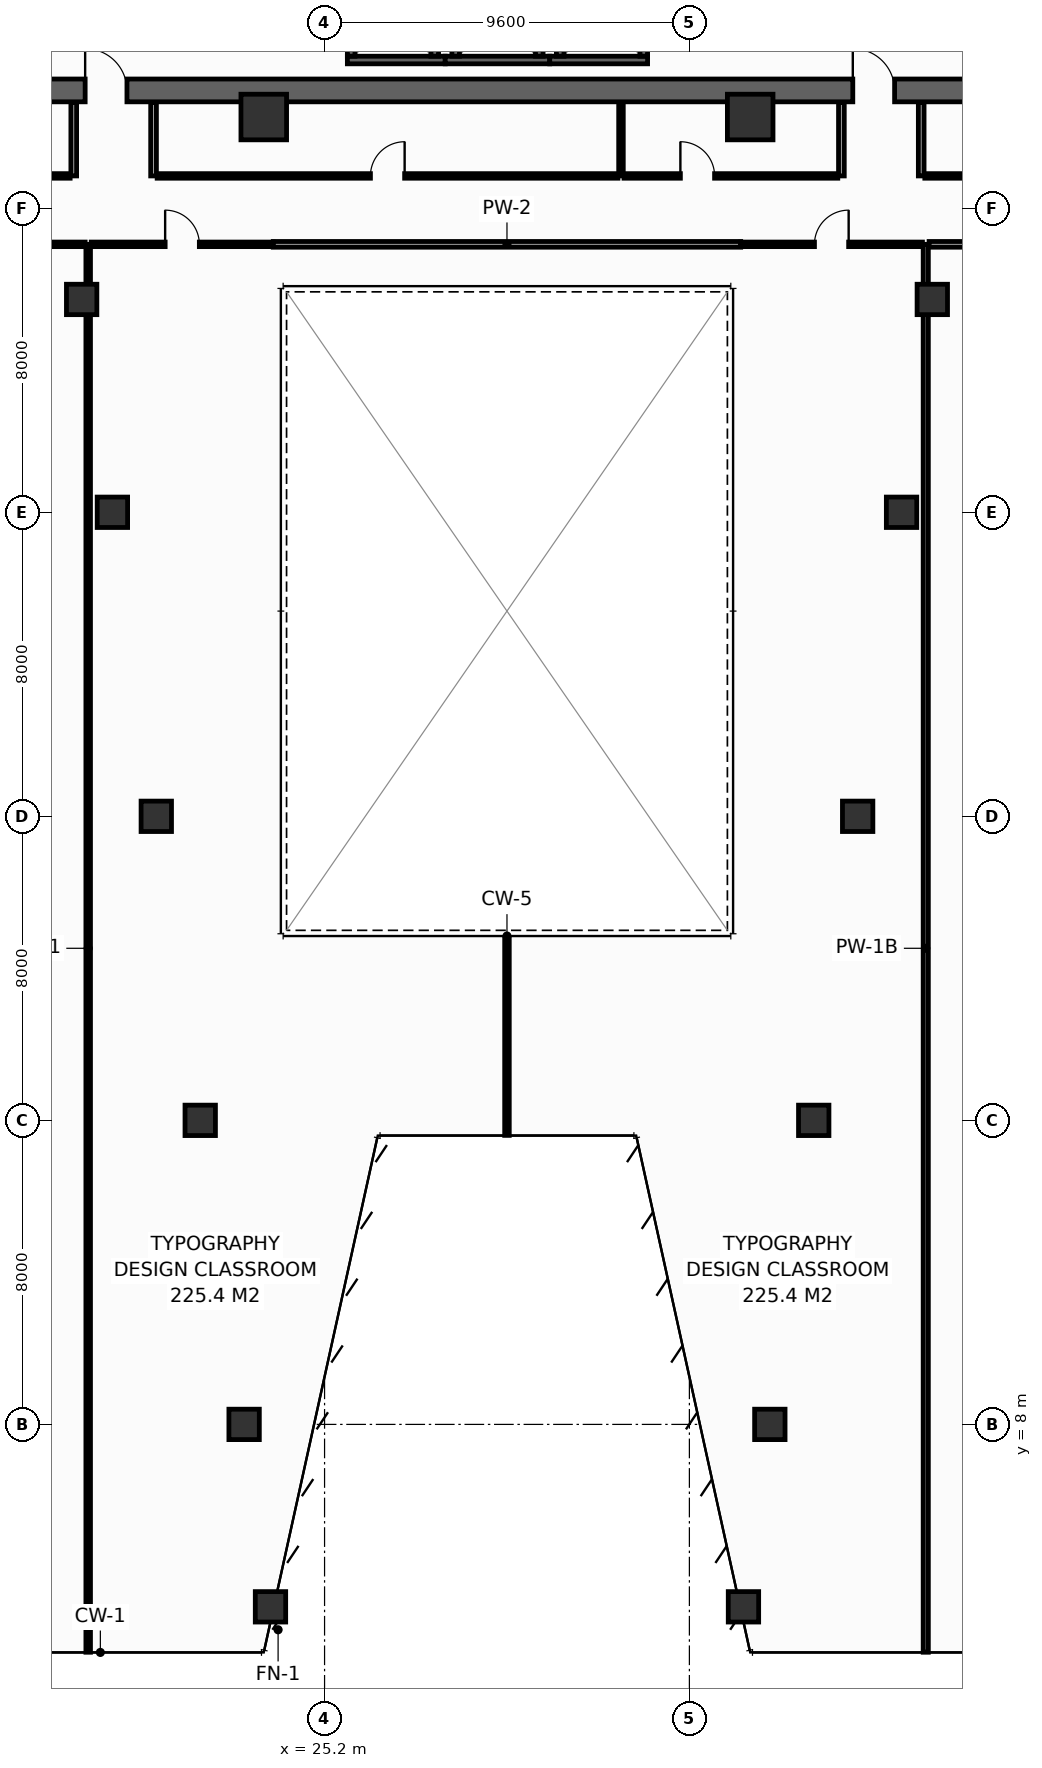
"""IFC4 building model, lengths in metres.
Left out: names, types, materials, properties, quantities, classifications, styles, units other than length and angle.
Written with IfcOpenShell. Run it as: python <this file> out.ifc"""

import sys

from ifc_helpers import new_model, si_unit, direction, frame, frame_2d, origin, origin_2d, place, context, subcontext, project, spatial, rectangle, hollow_rectangle, extrude, element, fill, save


model = new_model("IFC4")
c1 = context("Model", 3, precision=1e-05, world=origin(), true_north=direction((0.0, 1.0)))
c2 = subcontext(c1, "Body", "Model", "MODEL_VIEW")
j1 = project(units=[si_unit("LENGTHUNIT", "METRE"), si_unit("PLANEANGLEUNIT", "RADIAN")], contexts=[c1])
p1 = place(None, origin())
s1 = spatial("IfcSite", under=j1, at=p1, CompositionType="ELEMENT")
p2 = place(p1, origin())
s2 = spatial("IfcBuilding", under=s1, at=p2, CompositionType="ELEMENT")
p3 = place(p2, frame((0.0, 0.0, 73.6)))
s3 = spatial("IfcBuildingStorey", under=s2, at=p3, CompositionType="ELEMENT", Elevation=73.6)
p4 = place(p3, frame((13.5, 43.1, 0.0), z_axis=(0.0, 0.0, 1.0), x_axis=(1.0, 0.0, 0.0)))
e1 = element("IfcWall", 1, at=p4, inside=s3, PredefinedType="SHEAR", context=c2, shape_type="SweptSolid", body=[
    extrude(rectangle(XDim=32.9, YDim=0.6, at=frame_2d((16.45, 0.0))), origin(), (0.0, 0.0, 1.0), 4.15),
])
p5 = place(p4, frame((5.4, 0.0, 0.0)))
e2 = element("IfcOpeningElement", 2, at=p5, cuts=e1, PredefinedType="OPENING", context=c2, shape_type="SweptSolid", body=[
    extrude(rectangle(XDim=1.1, YDim=2.15, at=frame_2d((0.55, 1.075))), frame((0.0, 0.31, 0.0), z_axis=(0.0, -1.0, 0.0), x_axis=(1.0, 0.0, 0.0)), (0.0, 0.0, 1.0), 0.62),
])
p6 = place(p4, frame((25.6, 0.0, 0.0)))
e3 = element("IfcOpeningElement", 3, at=p6, cuts=e1, PredefinedType="OPENING", context=c2, shape_type="SweptSolid", body=[
    extrude(rectangle(XDim=1.1, YDim=2.15, at=frame_2d((0.55, 1.075))), frame((0.0, 0.31, 0.0), z_axis=(0.0, -1.0, 0.0), x_axis=(1.0, 0.0, 0.0)), (0.0, 0.0, 1.0), 0.62),
])
for number, where, z_axis, x_axis in (
    (4, (23.6, 42.4, 0.0), (0.0, 0.0, 1.0), (1.0, 0.0, 0.0)),
    (5, (36.4, 42.4, 0.0), (0.0, 0.0, 1.0), (1.0, 0.0, 0.0)),
):
    element("IfcColumn", number, at=place(p3, frame(where, z_axis=z_axis, x_axis=x_axis)), inside=s3, PredefinedType="COLUMN", context=c2, shape_type="SweptSolid", body=[
        extrude(hollow_rectangle(XDim=1.2, YDim=1.2, WallThickness=0.055, at=origin_2d()), origin(), (0.0, 0.0, 1.0), 4.4),
    ])
for number, where, z_axis, x_axis in (
    (6, (23.777, 3.2, 0.0), (0.0, 0.0, 1.0), (1.0, 0.0, 0.0)),
    (7, (36.223, 3.2, 0.0), (0.0, 0.0, 1.0), (1.0, 0.0, 0.0)),
    (8, (23.083, 8.0, 0.0), (0.0, 0.0, 1.0), (1.0, 0.0, 0.0)),
    (9, (36.917, 8.0, 0.0), (0.0, 0.0, 1.0), (1.0, 0.0, 0.0)),
    (10, (21.928, 16.0, 0.0), (0.0, 0.0, 1.0), (1.0, 0.0, 0.0)),
    (11, (38.072, 16.0, 0.0), (0.0, 0.0, 1.0), (1.0, 0.0, 0.0)),
    (12, (20.772, 24.0, 0.0), (0.0, 0.0, 1.0), (1.0, 0.0, 0.0)),
    (13, (39.228, 24.0, 0.0), (0.0, 0.0, 1.0), (1.0, 0.0, 0.0)),
    (14, (19.617, 32.0, 0.0), (0.0, 0.0, 1.0), (1.0, 0.0, 0.0)),
    (15, (40.383, 32.0, 0.0), (0.0, 0.0, 1.0), (1.0, 0.0, 0.0)),
    (16, (18.808, 37.6, 0.0), (0.0, 0.0, 1.0), (1.0, 0.0, 0.0)),
    (17, (41.192, 37.6, 0.0), (0.0, 0.0, 1.0), (1.0, 0.0, 0.0)),
):
    element("IfcColumn", number, at=place(p3, frame(where, z_axis=z_axis, x_axis=x_axis)), inside=s3, PredefinedType="COLUMN", context=c2, shape_type="SweptSolid", body=[
        extrude(hollow_rectangle(XDim=0.8, YDim=0.8, WallThickness=0.036, at=origin_2d()), origin(), (0.0, 0.0, 1.0), 4.4),
    ])
p7 = place(p3, frame((25.8, 43.9, 0.0), z_axis=(0.0, 0.0, 1.0), x_axis=(1.0, 0.0, 0.0)))
e18 = element("IfcWall", 18, at=p7, inside=s3, PredefinedType="SHEAR", context=c2, shape_type="SweptSolid", body=[
    extrude(rectangle(XDim=2.575, YDim=0.2, at=frame_2d((1.288, 0.0))), origin(), (0.0, 0.0, 1.0), 4.15),
])
for number, where, z_axis, x_axis in (
    (19, (25.9, 44.0, 0.0), (0.0, 0.0, 1.0), (0.0, 1.0, 0.0)),
    (20, (28.1, 44.0, 0.0), (0.0, 0.0, 1.0), (0.0, 1.0, 0.0)),
):
    element("IfcWall", number, at=place(p3, frame(where, z_axis=z_axis, x_axis=x_axis)), inside=s3, PredefinedType="SHEAR", context=c2, shape_type="SweptSolid", body=[
        extrude(rectangle(XDim=2.3, YDim=0.2, at=frame_2d((1.15, 0.0))), origin(), (0.0, 0.0, 1.0), 4.15),
    ])
p8 = place(p3, frame((28.375, 43.9, 0.0), z_axis=(0.0, 0.0, 1.0), x_axis=(1.0, 0.0, 0.0)))
e21 = element("IfcWall", 21, at=p8, inside=s3, PredefinedType="SHEAR", context=c2, shape_type="SweptSolid", body=[
    extrude(rectangle(XDim=2.75, YDim=0.2, at=frame_2d((1.375, 0.0))), origin(), (0.0, 0.0, 1.0), 4.15),
])
for number, where, z_axis, x_axis in (
    (22, (28.65, 44.0, 0.0), (0.0, 0.0, 1.0), (0.0, 1.0, 0.0)),
    (23, (30.85, 44.0, 0.0), (0.0, 0.0, 1.0), (0.0, 1.0, 0.0)),
):
    element("IfcWall", number, at=place(p3, frame(where, z_axis=z_axis, x_axis=x_axis)), inside=s3, PredefinedType="SHEAR", context=c2, shape_type="SweptSolid", body=[
        extrude(rectangle(XDim=2.3, YDim=0.2, at=frame_2d((1.15, 0.0))), origin(), (0.0, 0.0, 1.0), 4.15),
    ])
p9 = place(p3, frame((31.125, 43.9, 0.0), z_axis=(0.0, 0.0, 1.0), x_axis=(1.0, 0.0, 0.0)))
e24 = element("IfcWall", 24, at=p9, inside=s3, PredefinedType="SHEAR", context=c2, shape_type="SweptSolid", body=[
    extrude(rectangle(XDim=2.575, YDim=0.2, at=frame_2d((1.288, 0.0))), origin(), (0.0, 0.0, 1.0), 4.15),
])
for number, where, z_axis, x_axis in (
    (25, (31.4, 44.0, 0.0), (0.0, 0.0, 1.0), (0.0, 1.0, 0.0)),
    (26, (33.6, 44.0, 0.0), (0.0, 0.0, 1.0), (0.0, 1.0, 0.0)),
):
    element("IfcWall", number, at=place(p3, frame(where, z_axis=z_axis, x_axis=x_axis)), inside=s3, PredefinedType="SHEAR", context=c2, shape_type="SweptSolid", body=[
        extrude(rectangle(XDim=2.3, YDim=0.2, at=frame_2d((1.15, 0.0))), origin(), (0.0, 0.0, 1.0), 4.15),
    ])
for number, where, z_axis, x_axis in (
    (27, (18.6, 40.85, 0.0), (0.0, 0.0, 1.0), (0.0, 1.0, 0.0)),
    (28, (20.7, 40.85, 0.0), (0.0, 0.0, 1.0), (0.0, 1.0, 0.0)),
    (29, (38.8, 40.85, 0.0), (0.0, 0.0, 1.0), (0.0, 1.0, 0.0)),
    (30, (40.9, 40.85, 0.0), (0.0, 0.0, 1.0), (0.0, 1.0, 0.0)),
):
    element("IfcWall", number, at=place(p3, frame(where, z_axis=z_axis, x_axis=x_axis)), inside=s3, PredefinedType="PARTITIONING", context=c2, shape_type="SweptSolid", body=[
        extrude(rectangle(XDim=1.93, YDim=0.15, at=frame_2d((0.965, 0.0))), origin(), (0.0, 0.0, 1.0), 4.15),
    ])
p10 = place(p3, frame((13.85, 40.85, 0.0), z_axis=(0.0, 0.0, 1.0), x_axis=(1.0, 0.0, 0.0)))
e31 = element("IfcWall", 31, at=p10, inside=s3, PredefinedType="PARTITIONING", context=c2, shape_type="SweptSolid", body=[
    extrude(rectangle(XDim=4.655, YDim=0.12, at=frame_2d((2.327, 0.0))), origin(), (0.0, 0.0, 1.0), 4.15),
])
p11 = place(p10, frame((1.877, 0.0, 0.0)))
e32 = element("IfcOpeningElement", 32, at=p11, cuts=e31, PredefinedType="OPENING", context=c2, shape_type="SweptSolid", body=[
    extrude(rectangle(XDim=0.9, YDim=2.1, at=frame_2d((0.45, 1.05))), frame((0.0, 0.07, 0.0), z_axis=(0.0, -1.0, 0.0), x_axis=(1.0, 0.0, 0.0)), (0.0, 0.0, 1.0), 0.14),
])
p12 = place(p3, frame((33.0, 40.85, 0.0), z_axis=(0.0, 0.0, 1.0), x_axis=(0.0, 1.0, 0.0)))
e33 = element("IfcWall", 33, at=p12, inside=s3, PredefinedType="PARTITIONING", context=c2, shape_type="SweptSolid", body=[
    extrude(rectangle(XDim=1.93, YDim=0.12, at=frame_2d((0.965, 0.0))), origin(), (0.0, 0.0, 1.0), 3.335),
])
p13 = place(p3, frame((20.795, 40.85, 0.0), z_axis=(0.0, 0.0, 1.0), x_axis=(1.0, 0.0, 0.0)))
e34 = element("IfcWall", 34, at=p13, inside=s3, PredefinedType="PARTITIONING", context=c2, shape_type="SweptSolid", body=[
    extrude(rectangle(XDim=12.125, YDim=0.12, at=frame_2d((6.062, 0.0))), origin(), (0.0, 0.0, 1.0), 3.335),
])
p14 = place(p13, frame((5.612, 0.0, 0.0)))
e35 = element("IfcOpeningElement", 35, at=p14, cuts=e34, PredefinedType="OPENING", context=c2, shape_type="SweptSolid", body=[
    extrude(rectangle(XDim=0.9, YDim=2.1, at=frame_2d((0.45, 1.05))), frame((0.0, 0.07, 0.0), z_axis=(0.0, -1.0, 0.0), x_axis=(1.0, 0.0, 0.0)), (0.0, 0.0, 1.0), 0.14),
])
p15 = place(p3, frame((33.08, 40.85, 0.0), z_axis=(0.0, 0.0, 1.0), x_axis=(1.0, 0.0, 0.0)))
e36 = element("IfcWall", 36, at=p15, inside=s3, PredefinedType="PARTITIONING", context=c2, shape_type="SweptSolid", body=[
    extrude(rectangle(XDim=5.625, YDim=0.12, at=frame_2d((2.812, 0.0))), origin(), (0.0, 0.0, 1.0), 3.335),
])
p16 = place(p15, frame((1.483, 0.0, 0.0)))
e37 = element("IfcOpeningElement", 37, at=p16, cuts=e36, PredefinedType="OPENING", context=c2, shape_type="SweptSolid", body=[
    extrude(rectangle(XDim=0.9, YDim=2.1, at=frame_2d((0.45, 1.05))), frame((0.0, 0.07, 0.0), z_axis=(0.0, -1.0, 0.0), x_axis=(1.0, 0.0, 0.0)), (0.0, 0.0, 1.0), 0.14),
])
p17 = place(p3, frame((40.995, 40.85, 0.0), z_axis=(0.0, 0.0, 1.0), x_axis=(1.0, 0.0, 0.0)))
e38 = element("IfcWall", 38, at=p17, inside=s3, PredefinedType="PARTITIONING", context=c2, shape_type="SweptSolid", body=[
    extrude(rectangle(XDim=5.155, YDim=0.12, at=frame_2d((2.577, 0.0))), origin(), (0.0, 0.0, 1.0), 4.15),
])
p18 = place(p17, frame((2.128, 0.0, 0.0)))
e39 = element("IfcOpeningElement", 39, at=p18, cuts=e38, PredefinedType="OPENING", context=c2, shape_type="SweptSolid", body=[
    extrude(rectangle(XDim=0.9, YDim=2.1, at=frame_2d((0.45, 1.05))), frame((0.0, 0.07, 0.0), z_axis=(0.0, -1.0, 0.0), x_axis=(1.0, 0.0, 0.0)), (0.0, 0.0, 1.0), 0.14),
])
p19 = place(p3, frame((18.98, 2.005, 0.0), z_axis=(0.0, 0.0, 1.0), x_axis=(0.0, 1.0, 0.0)))
e40 = element("IfcWall", 40, at=p19, inside=s3, PredefinedType="PARTITIONING", context=c2, shape_type="SweptSolid", body=[
    extrude(rectangle(XDim=37.045, YDim=0.12, at=frame_2d((18.522, 0.0))), origin(), (0.0, 0.0, 1.0), 3.335),
])
p20 = place(p3, frame((41.02, 2.005, 0.0), z_axis=(0.0, 0.0, 1.0), x_axis=(0.0, 1.0, 0.0)))
e41 = element("IfcWall", 41, at=p20, inside=s3, PredefinedType="PARTITIONING", context=c2, shape_type="SweptSolid", body=[
    extrude(rectangle(XDim=37.045, YDim=0.135, at=frame_2d((18.522, 0.0))), origin(), (0.0, 0.0, 1.0), 3.335),
])
p21 = place(p3, frame((30.0, 15.605, 0.0), z_axis=(0.0, 0.0, 1.0), x_axis=(0.0, 1.0, 0.0)))
e42 = element("IfcWall", 42, at=p21, inside=s3, PredefinedType="PARTITIONING", context=c2, shape_type="SweptSolid", body=[
    extrude(rectangle(XDim=5.175, YDim=0.12, at=frame_2d((2.587, 0.0))), origin(), (0.0, 0.0, 1.0), 4.15),
])
p22 = place(p3, frame((13.32, 39.05, 0.0), z_axis=(0.0, 0.0, 1.0), x_axis=(1.0, 0.0, 0.0)))
e43 = element("IfcWall", 43, at=p22, inside=s3, PredefinedType="PARTITIONING", context=c2, shape_type="SweptSolid", body=[
    extrude(rectangle(XDim=5.58, YDim=0.12, at=frame_2d((2.79, 0.0))), origin(), (0.0, 0.0, 1.0), 4.15),
])
p23 = place(p22, frame((2.34, 0.0, 0.0)))
e44 = element("IfcOpeningElement", 44, at=p23, cuts=e43, PredefinedType="OPENING", context=c2, shape_type="SweptSolid", body=[
    extrude(rectangle(XDim=0.9, YDim=2.1, at=frame_2d((0.45, 1.05))), frame((0.0, 0.07, 0.0), z_axis=(0.0, -1.0, 0.0), x_axis=(1.0, 0.0, 0.0)), (0.0, 0.0, 1.0), 0.14),
])
p24 = place(p3, frame((19.06, 39.05, 0.0), z_axis=(0.0, 0.0, 1.0), x_axis=(1.0, 0.0, 0.0)))
e45 = element("IfcWall", 45, at=p24, inside=s3, PredefinedType="PARTITIONING", context=c2, shape_type="SweptSolid", body=[
    extrude(rectangle(XDim=4.79, YDim=0.12, at=frame_2d((2.395, 0.0))), origin(), (0.0, 0.0, 1.0), 3.335),
])
p25 = place(p24, frame((1.945, 0.0, 0.0)))
e46 = element("IfcOpeningElement", 46, at=p25, cuts=e45, PredefinedType="OPENING", context=c2, shape_type="SweptSolid", body=[
    extrude(rectangle(XDim=0.9, YDim=2.1, at=frame_2d((0.45, 1.05))), frame((0.0, 0.07, 0.0), z_axis=(0.0, -1.0, 0.0), x_axis=(1.0, 0.0, 0.0)), (0.0, 0.0, 1.0), 0.14),
])
p26 = place(p3, frame((23.85, 39.05, 0.0), z_axis=(0.0, 0.0, 1.0), x_axis=(1.0, 0.0, 0.0)))
e47 = element("IfcWall", 47, at=p26, inside=s3, PredefinedType="PARTITIONING", context=c2, shape_type="SweptSolid", body=[
    extrude(rectangle(XDim=12.3, YDim=0.15, at=frame_2d((6.15, 0.0))), origin(), (0.0, 0.0, 1.0), 4.15),
])
p27 = place(p3, frame((36.15, 39.05, 0.0), z_axis=(0.0, 0.0, 1.0), x_axis=(1.0, 0.0, 0.0)))
e48 = element("IfcWall", 48, at=p27, inside=s3, PredefinedType="PARTITIONING", context=c2, shape_type="SweptSolid", body=[
    extrude(rectangle(XDim=4.783, YDim=0.12, at=frame_2d((2.391, 0.0))), origin(), (0.0, 0.0, 1.0), 3.335),
])
p28 = place(p27, frame((1.941, 0.0, 0.0)))
e49 = element("IfcOpeningElement", 49, at=p28, cuts=e48, PredefinedType="OPENING", context=c2, shape_type="SweptSolid", body=[
    extrude(rectangle(XDim=0.9, YDim=2.1, at=frame_2d((0.45, 1.05))), frame((0.0, 0.07, 0.0), z_axis=(0.0, -1.0, 0.0), x_axis=(1.0, 0.0, 0.0)), (0.0, 0.0, 1.0), 0.14),
])
p29 = place(p3, frame((41.107, 39.05, 0.0), z_axis=(0.0, 0.0, 1.0), x_axis=(1.0, 0.0, 0.0)))
e50 = element("IfcWall", 50, at=p29, inside=s3, PredefinedType="PARTITIONING", context=c2, shape_type="SweptSolid", body=[
    extrude(rectangle(XDim=5.565, YDim=0.15, at=frame_2d((2.783, 0.0))), origin(), (0.0, 0.0, 1.0), 4.15),
])
p30 = place(p29, frame((2.257, 0.0, 0.0)))
e51 = element("IfcOpeningElement", 51, at=p30, cuts=e50, PredefinedType="OPENING", context=c2, shape_type="SweptSolid", body=[
    extrude(rectangle(XDim=1.05, YDim=2.15, at=frame_2d((0.525, 1.075))), frame((0.0, 0.085, 0.0), z_axis=(0.0, -1.0, 0.0), x_axis=(1.0, 0.0, 0.0)), (0.0, 0.0, 1.0), 0.17),
])
p31 = place(p5, origin())
e52 = element("IfcDoor", 52, at=p31, inside=s3, OperationType="SINGLE_SWING_LEFT", PredefinedType="DOOR", context=c2, shape_type="SweptSolid", body=[
    extrude(rectangle(XDim=1.1, YDim=2.15, at=frame_2d((0.55, 1.075))), frame((0.0, 0.025, 0.0), z_axis=(0.0, -1.0, 0.0), x_axis=(1.0, 0.0, 0.0)), (0.0, 0.0, 1.0), 0.05),
])
fill(e2, e52)
p32 = place(p6, origin())
e53 = element("IfcDoor", 53, at=p32, inside=s3, OperationType="SINGLE_SWING_LEFT", PredefinedType="DOOR", context=c2, shape_type="SweptSolid", body=[
    extrude(rectangle(XDim=1.1, YDim=2.15, at=frame_2d((0.55, 1.075))), frame((0.0, 0.025, 0.0), z_axis=(0.0, -1.0, 0.0), x_axis=(1.0, 0.0, 0.0)), (0.0, 0.0, 1.0), 0.05),
])
fill(e3, e53)
p33 = place(p14, origin())
e54 = element("IfcDoor", 54, at=p33, inside=s3, OperationType="SINGLE_SWING_RIGHT", PredefinedType="DOOR", context=c2, shape_type="SweptSolid", body=[
    extrude(rectangle(XDim=0.9, YDim=2.1, at=frame_2d((0.45, 1.05))), frame((0.0, 0.025, 0.0), z_axis=(0.0, -1.0, 0.0), x_axis=(1.0, 0.0, 0.0)), (0.0, 0.0, 1.0), 0.05),
])
fill(e35, e54)
p34 = place(p16, origin())
e55 = element("IfcDoor", 55, at=p34, inside=s3, OperationType="SINGLE_SWING_LEFT", PredefinedType="DOOR", context=c2, shape_type="SweptSolid", body=[
    extrude(rectangle(XDim=0.9, YDim=2.1, at=frame_2d((0.45, 1.05))), frame((0.0, 0.025, 0.0), z_axis=(0.0, -1.0, 0.0), x_axis=(1.0, 0.0, 0.0)), (0.0, 0.0, 1.0), 0.05),
])
fill(e37, e55)
p35 = place(p25, origin())
e56 = element("IfcDoor", 56, at=p35, inside=s3, OperationType="SINGLE_SWING_LEFT", PredefinedType="DOOR", context=c2, shape_type="SweptSolid", body=[
    extrude(rectangle(XDim=0.9, YDim=2.1, at=frame_2d((0.45, 1.05))), frame((0.0, 0.025, 0.0), z_axis=(0.0, -1.0, 0.0), x_axis=(1.0, 0.0, 0.0)), (0.0, 0.0, 1.0), 0.05),
])
fill(e46, e56)
p36 = place(p28, origin())
e57 = element("IfcDoor", 57, at=p36, inside=s3, OperationType="SINGLE_SWING_RIGHT", PredefinedType="DOOR", context=c2, shape_type="SweptSolid", body=[
    extrude(rectangle(XDim=0.9, YDim=2.1, at=frame_2d((0.45, 1.05))), frame((0.0, 0.025, 0.0), z_axis=(0.0, -1.0, 0.0), x_axis=(1.0, 0.0, 0.0)), (0.0, 0.0, 1.0), 0.05),
])
fill(e49, e57)
save(model, sys.argv[1])
